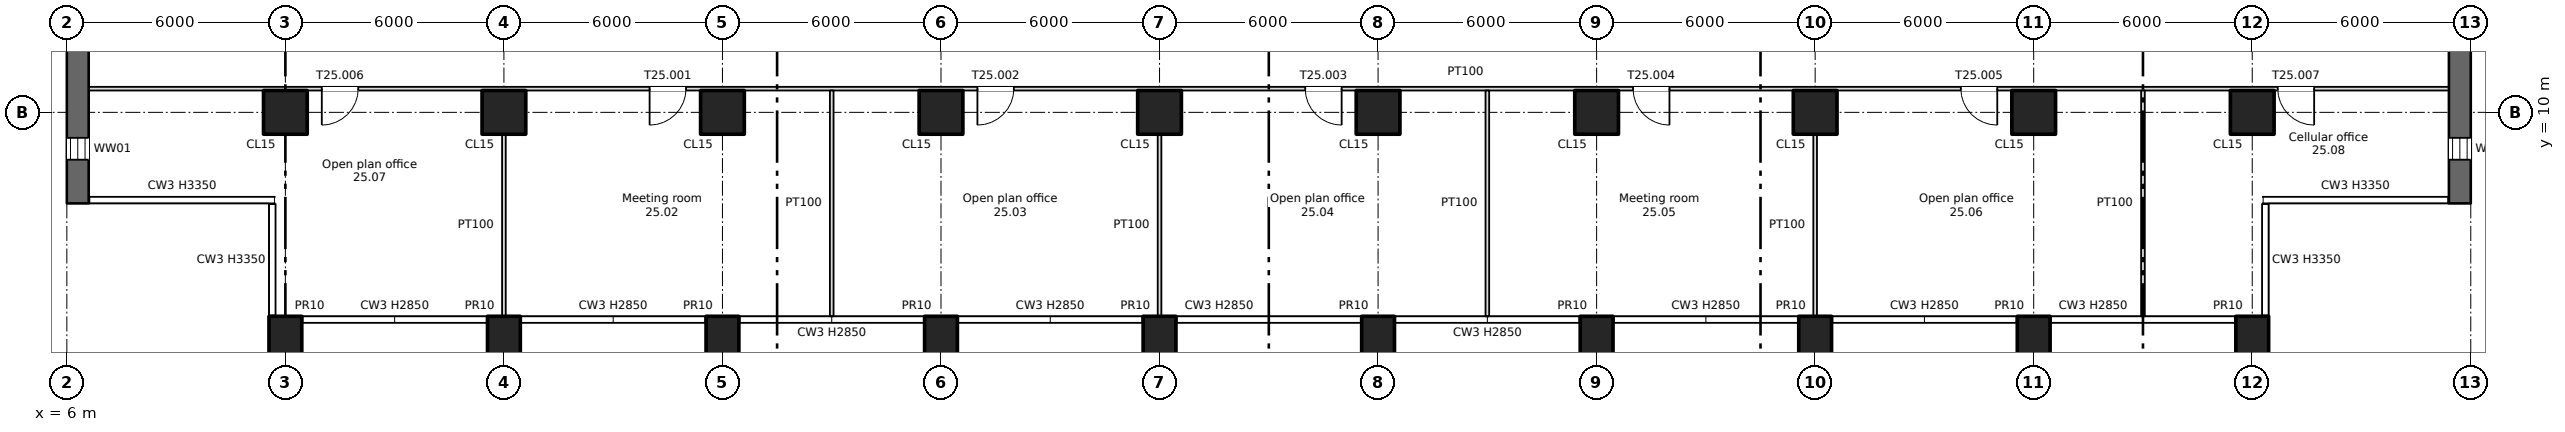
"""IFC4 building model, lengths in metres.
Left out: names, types, materials, properties, quantities, classifications, styles, units other than length and angle.
Written with IfcOpenShell. Run it as: python <this file> out.ifc"""

import sys

from ifc_helpers import new_model, si_unit, direction, frame, frame_2d, origin, origin_2d, place, context, subcontext, project, spatial, rectangle, extrude, element, fill, save


model = new_model("IFC4")
c1 = context("Model", 3, precision=1e-05, world=origin(), true_north=direction((0.0, 1.0)))
c2 = subcontext(c1, "Body", "Model", "MODEL_VIEW")
j1 = project(units=[si_unit("LENGTHUNIT", "METRE"), si_unit("PLANEANGLEUNIT", "RADIAN")], contexts=[c1])
p1 = place(None, origin())
s1 = spatial("IfcSite", under=j1, at=p1, CompositionType="ELEMENT")
p2 = place(p1, origin())
s2 = spatial("IfcBuilding", under=s1, at=p2, CompositionType="ELEMENT")
p3 = place(p2, frame((0.0, 0.0, 170.5)))
s3 = spatial("IfcBuildingStorey", under=s2, at=p3, CompositionType="ELEMENT", Elevation=170.5)
for number, where, z_axis, x_axis in (
    (1, (12.0, 3.7, -0.4), (0.0, 0.0, 1.0), (1.0, 0.0, 0.0)),
    (2, (18.0, 3.7, -0.4), (0.0, 0.0, 1.0), (1.0, 0.0, 0.0)),
    (3, (24.0, 3.7, -0.4), (0.0, 0.0, 1.0), (1.0, 0.0, 0.0)),
    (4, (30.0, 3.7, -0.4), (0.0, 0.0, 1.0), (1.0, 0.0, 0.0)),
    (5, (36.0, 3.7, -0.4), (0.0, 0.0, 1.0), (1.0, 0.0, 0.0)),
    (6, (42.0, 3.7, -0.4), (0.0, 0.0, 1.0), (1.0, 0.0, 0.0)),
    (7, (48.0, 3.7, -0.4), (0.0, 0.0, 1.0), (1.0, 0.0, 0.0)),
    (8, (54.0, 3.7, -0.4), (0.0, 0.0, 1.0), (1.0, 0.0, 0.0)),
    (9, (60.0, 3.7, -0.4), (0.0, 0.0, 1.0), (1.0, 0.0, 0.0)),
    (10, (66.0, 3.7, -0.4), (0.0, 0.0, 1.0), (1.0, 0.0, 0.0)),
):
    element("IfcColumn", number, at=place(p3, frame(where, z_axis=z_axis, x_axis=x_axis)), inside=s3, PredefinedType="COLUMN", context=c2, shape_type="SweptSolid", body=[
        extrude(rectangle(XDim=0.9, YDim=1.4, at=origin_2d()), origin(), (0.0, 0.0, 1.0), 3.75),
    ])
for number, where, z_axis, x_axis in (
    (11, (12.0, 10.0, 0.0), (0.0, 0.0, 1.0), (1.0, 0.0, 0.0)),
    (12, (18.0, 10.0, 0.0), (0.0, 0.0, 1.0), (1.0, 0.0, 0.0)),
    (13, (24.0, 10.0, 0.0), (0.0, 0.0, 1.0), (1.0, 0.0, 0.0)),
    (14, (30.0, 10.0, 0.0), (0.0, 0.0, 1.0), (1.0, 0.0, 0.0)),
    (15, (36.0, 10.0, 0.0), (0.0, 0.0, 1.0), (1.0, 0.0, 0.0)),
    (16, (42.0, 10.0, 0.0), (0.0, 0.0, 1.0), (1.0, 0.0, 0.0)),
    (17, (48.0, 10.0, 0.0), (0.0, 0.0, 1.0), (1.0, 0.0, 0.0)),
    (18, (54.0, 10.0, 0.0), (0.0, 0.0, 1.0), (1.0, 0.0, 0.0)),
    (19, (60.0, 10.0, 0.0), (0.0, 0.0, 1.0), (1.0, 0.0, 0.0)),
    (20, (66.0, 10.0, 0.0), (0.0, 0.0, 1.0), (1.0, 0.0, 0.0)),
):
    element("IfcColumn", number, at=place(p3, frame(where, z_axis=z_axis, x_axis=x_axis)), inside=s3, PredefinedType="COLUMN", context=c2, shape_type="SweptSolid", body=[
        extrude(rectangle(XDim=1.2, YDim=1.2, at=origin_2d()), origin(), (0.0, 0.0, 1.0), 3.35),
    ])
p4 = place(p3, frame((6.3, 7.5, 0.0), z_axis=(0.0, 0.0, 1.0), x_axis=(0.0, 1.0, 0.0)))
e21 = element("IfcWall", 21, at=p4, inside=s3, PredefinedType="SHEAR", context=c2, shape_type="SweptSolid", body=[
    extrude(rectangle(XDim=34.0, YDim=0.6, at=frame_2d((17.0, 0.0))), origin(), (0.0, 0.0, 1.0), 3.35),
])
p5 = place(p4, frame((1.2, 0.0, 0.6)))
e22 = element("IfcOpeningElement", 22, at=p5, cuts=e21, PredefinedType="OPENING", context=c2, shape_type="SweptSolid", body=[
    extrude(rectangle(XDim=0.6, YDim=2.4, at=frame_2d((0.3, 1.2))), frame((0.0, 0.31, 0.0), z_axis=(0.0, -1.0, 0.0), x_axis=(1.0, 0.0, 0.0)), (0.0, 0.0, 1.0), 0.62),
])
p6 = place(p4, frame((7.2, 0.0, 0.6)))
e23 = element("IfcOpeningElement", 23, at=p6, cuts=e21, PredefinedType="OPENING", context=c2, shape_type="SweptSolid", body=[
    extrude(rectangle(XDim=0.6, YDim=2.4, at=frame_2d((0.3, 1.2))), frame((0.0, 0.31, 0.0), z_axis=(0.0, -1.0, 0.0), x_axis=(1.0, 0.0, 0.0)), (0.0, 0.0, 1.0), 0.62),
])
p7 = place(p4, frame((19.2, 0.0, 0.6)))
e24 = element("IfcOpeningElement", 24, at=p7, cuts=e21, PredefinedType="OPENING", context=c2, shape_type="SweptSolid", body=[
    extrude(rectangle(XDim=0.6, YDim=2.4, at=frame_2d((0.3, 1.2))), frame((0.0, 0.31, 0.0), z_axis=(0.0, -1.0, 0.0), x_axis=(1.0, 0.0, 0.0)), (0.0, 0.0, 1.0), 0.62),
])
p8 = place(p3, frame((71.7, 7.5, 0.0), z_axis=(0.0, 0.0, 1.0), x_axis=(0.0, 1.0, 0.0)))
e25 = element("IfcWall", 25, at=p8, inside=s3, PredefinedType="SHEAR", context=c2, shape_type="SweptSolid", body=[
    extrude(rectangle(XDim=34.0, YDim=0.6, at=frame_2d((17.0, 0.0))), origin(), (0.0, 0.0, 1.0), 3.35),
])
p9 = place(p8, frame((1.2, 0.0, 0.6)))
e26 = element("IfcOpeningElement", 26, at=p9, cuts=e25, PredefinedType="OPENING", context=c2, shape_type="SweptSolid", body=[
    extrude(rectangle(XDim=0.6, YDim=2.4, at=frame_2d((0.3, 1.2))), frame((0.0, 0.31, 0.0), z_axis=(0.0, -1.0, 0.0), x_axis=(1.0, 0.0, 0.0)), (0.0, 0.0, 1.0), 0.62),
])
p10 = place(p8, frame((7.2, 0.0, 0.6)))
e27 = element("IfcOpeningElement", 27, at=p10, cuts=e25, PredefinedType="OPENING", context=c2, shape_type="SweptSolid", body=[
    extrude(rectangle(XDim=0.6, YDim=2.4, at=frame_2d((0.3, 1.2))), frame((0.0, 0.31, 0.0), z_axis=(0.0, -1.0, 0.0), x_axis=(1.0, 0.0, 0.0)), (0.0, 0.0, 1.0), 0.62),
])
p11 = place(p8, frame((13.2, 0.0, 0.6)))
e28 = element("IfcOpeningElement", 28, at=p11, cuts=e25, PredefinedType="OPENING", context=c2, shape_type="SweptSolid", body=[
    extrude(rectangle(XDim=0.6, YDim=2.4, at=frame_2d((0.3, 1.2))), frame((0.0, 0.31, 0.0), z_axis=(0.0, -1.0, 0.0), x_axis=(1.0, 0.0, 0.0)), (0.0, 0.0, 1.0), 0.62),
])
p12 = place(p8, frame((19.2, 0.0, 0.6)))
e29 = element("IfcOpeningElement", 29, at=p12, cuts=e25, PredefinedType="OPENING", context=c2, shape_type="SweptSolid", body=[
    extrude(rectangle(XDim=0.6, YDim=2.4, at=frame_2d((0.3, 1.2))), frame((0.0, 0.31, 0.0), z_axis=(0.0, -1.0, 0.0), x_axis=(1.0, 0.0, 0.0)), (0.0, 0.0, 1.0), 0.62),
])
p13 = place(p8, frame((25.2, 0.0, 0.6)))
e30 = element("IfcOpeningElement", 30, at=p13, cuts=e25, PredefinedType="OPENING", context=c2, shape_type="SweptSolid", body=[
    extrude(rectangle(XDim=0.6, YDim=2.4, at=frame_2d((0.3, 1.2))), frame((0.0, 0.31, 0.0), z_axis=(0.0, -1.0, 0.0), x_axis=(1.0, 0.0, 0.0)), (0.0, 0.0, 1.0), 0.62),
])
p14 = place(p8, frame((31.2, 0.0, 0.6)))
e31 = element("IfcOpeningElement", 31, at=p14, cuts=e25, PredefinedType="OPENING", context=c2, shape_type="SweptSolid", body=[
    extrude(rectangle(XDim=0.6, YDim=2.4, at=frame_2d((0.3, 1.2))), frame((0.0, 0.31, 0.0), z_axis=(0.0, -1.0, 0.0), x_axis=(1.0, 0.0, 0.0)), (0.0, 0.0, 1.0), 0.62),
])
p15 = place(p3, frame((6.6, 10.65, 0.0), z_axis=(0.0, 0.0, 1.0), x_axis=(1.0, 0.0, 0.0)))
e32 = element("IfcWall", 32, at=p15, inside=s3, PredefinedType="PARTITIONING", context=c2, shape_type="SweptSolid", body=[
    extrude(rectangle(XDim=64.8, YDim=0.1, at=frame_2d((32.4, 0.0))), origin(), (0.0, 0.0, 1.0), 3.35),
])
p16 = place(p15, frame((15.4, 0.0, 0.0)))
e33 = element("IfcOpeningElement", 33, at=p16, cuts=e32, PredefinedType="OPENING", context=c2, shape_type="SweptSolid", body=[
    extrude(rectangle(XDim=1.0, YDim=2.1, at=frame_2d((0.5, 1.05))), frame((0.0, 0.06, 0.0), z_axis=(0.0, -1.0, 0.0), x_axis=(1.0, 0.0, 0.0)), (0.0, 0.0, 1.0), 0.12),
])
p17 = place(p15, frame((24.4, 0.0, 0.0)))
e34 = element("IfcOpeningElement", 34, at=p17, cuts=e32, PredefinedType="OPENING", context=c2, shape_type="SweptSolid", body=[
    extrude(rectangle(XDim=1.0, YDim=2.1, at=frame_2d((0.5, 1.05))), frame((0.0, 0.06, 0.0), z_axis=(0.0, -1.0, 0.0), x_axis=(1.0, 0.0, 0.0)), (0.0, 0.0, 1.0), 0.12),
])
p18 = place(p15, frame((33.4, 0.0, 0.0)))
e35 = element("IfcOpeningElement", 35, at=p18, cuts=e32, PredefinedType="OPENING", context=c2, shape_type="SweptSolid", body=[
    extrude(rectangle(XDim=1.0, YDim=2.1, at=frame_2d((0.5, 1.05))), frame((0.0, 0.06, 0.0), z_axis=(0.0, -1.0, 0.0), x_axis=(1.0, 0.0, 0.0)), (0.0, 0.0, 1.0), 0.12),
])
p19 = place(p15, frame((42.4, 0.0, 0.0)))
e36 = element("IfcOpeningElement", 36, at=p19, cuts=e32, PredefinedType="OPENING", context=c2, shape_type="SweptSolid", body=[
    extrude(rectangle(XDim=1.0, YDim=2.1, at=frame_2d((0.5, 1.05))), frame((0.0, 0.06, 0.0), z_axis=(0.0, -1.0, 0.0), x_axis=(1.0, 0.0, 0.0)), (0.0, 0.0, 1.0), 0.12),
])
p20 = place(p15, frame((51.4, 0.0, 0.0)))
e37 = element("IfcOpeningElement", 37, at=p20, cuts=e32, PredefinedType="OPENING", context=c2, shape_type="SweptSolid", body=[
    extrude(rectangle(XDim=1.0, YDim=2.1, at=frame_2d((0.5, 1.05))), frame((0.0, 0.06, 0.0), z_axis=(0.0, -1.0, 0.0), x_axis=(1.0, 0.0, 0.0)), (0.0, 0.0, 1.0), 0.12),
])
p21 = place(p15, frame((6.4, 0.0, 0.0)))
e38 = element("IfcOpeningElement", 38, at=p21, cuts=e32, PredefinedType="OPENING", context=c2, shape_type="SweptSolid", body=[
    extrude(rectangle(XDim=1.0, YDim=2.1, at=frame_2d((0.5, 1.05))), frame((0.0, 0.06, 0.0), z_axis=(0.0, -1.0, 0.0), x_axis=(1.0, 0.0, 0.0)), (0.0, 0.0, 1.0), 0.12),
])
p22 = place(p15, frame((60.1, 0.0, 0.0)))
e39 = element("IfcOpeningElement", 39, at=p22, cuts=e32, PredefinedType="OPENING", context=c2, shape_type="SweptSolid", body=[
    extrude(rectangle(XDim=1.0, YDim=2.1, at=frame_2d((0.5, 1.05))), frame((0.0, 0.06, 0.0), z_axis=(0.0, -1.0, 0.0), x_axis=(1.0, 0.0, 0.0)), (0.0, 0.0, 1.0), 0.12),
])
p23 = place(p3, frame((18.0, 4.4, 0.0), z_axis=(0.0, 0.0, 1.0), x_axis=(0.0, 1.0, 0.0)))
e40 = element("IfcWall", 40, at=p23, inside=s3, PredefinedType="PARTITIONING", context=c2, shape_type="SweptSolid", body=[
    extrude(rectangle(XDim=5.0, YDim=0.1, at=frame_2d((2.5, 0.0))), origin(), (0.0, 0.0, 1.0), 3.35),
])
p24 = place(p3, frame((27.0, 4.4, 0.0), z_axis=(0.0, 0.0, 1.0), x_axis=(0.0, 1.0, 0.0)))
e41 = element("IfcWall", 41, at=p24, inside=s3, PredefinedType="PARTITIONING", context=c2, shape_type="SweptSolid", body=[
    extrude(rectangle(XDim=6.2, YDim=0.1, at=frame_2d((3.1, 0.0))), origin(), (0.0, 0.0, 1.0), 3.35),
])
p25 = place(p3, frame((36.0, 4.4, 0.0), z_axis=(0.0, 0.0, 1.0), x_axis=(0.0, 1.0, 0.0)))
e42 = element("IfcWall", 42, at=p25, inside=s3, PredefinedType="PARTITIONING", context=c2, shape_type="SweptSolid", body=[
    extrude(rectangle(XDim=5.0, YDim=0.1, at=frame_2d((2.5, 0.0))), origin(), (0.0, 0.0, 1.0), 3.35),
])
p26 = place(p3, frame((45.0, 4.4, 0.0), z_axis=(0.0, 0.0, 1.0), x_axis=(0.0, 1.0, 0.0)))
e43 = element("IfcWall", 43, at=p26, inside=s3, PredefinedType="PARTITIONING", context=c2, shape_type="SweptSolid", body=[
    extrude(rectangle(XDim=6.2, YDim=0.1, at=frame_2d((3.1, 0.0))), origin(), (0.0, 0.0, 1.0), 3.35),
])
p27 = place(p3, frame((54.0, 4.4, 0.0), z_axis=(0.0, 0.0, 1.0), x_axis=(0.0, 1.0, 0.0)))
e44 = element("IfcWall", 44, at=p27, inside=s3, PredefinedType="PARTITIONING", context=c2, shape_type="SweptSolid", body=[
    extrude(rectangle(XDim=5.0, YDim=0.1, at=frame_2d((2.5, 0.0))), origin(), (0.0, 0.0, 1.0), 3.35),
])
p28 = place(p3, frame((63.0, 4.4, 0.0), z_axis=(0.0, 0.0, 1.0), x_axis=(0.0, 1.0, 0.0)))
e45 = element("IfcWall", 45, at=p28, inside=s3, PredefinedType="PARTITIONING", context=c2, shape_type="SweptSolid", body=[
    extrude(rectangle(XDim=6.2, YDim=0.1, at=frame_2d((3.1, 0.0))), origin(), (0.0, 0.0, 1.0), 3.35),
])
p29 = place(p5, origin())
e46 = element("IfcWindow", 46, at=p29, inside=s3, PartitioningType="SINGLE_PANEL", PredefinedType="WINDOW", context=c2, shape_type="SweptSolid", body=[
    extrude(rectangle(XDim=0.6, YDim=2.4, at=frame_2d((0.3, 1.2))), frame((0.0, 0.03, 0.0), z_axis=(0.0, -1.0, 0.0), x_axis=(1.0, 0.0, 0.0)), (0.0, 0.0, 1.0), 0.06),
])
fill(e22, e46)
p30 = place(p9, origin())
e47 = element("IfcWindow", 47, at=p30, inside=s3, PartitioningType="SINGLE_PANEL", PredefinedType="WINDOW", context=c2, shape_type="SweptSolid", body=[
    extrude(rectangle(XDim=0.6, YDim=2.4, at=frame_2d((0.3, 1.2))), frame((0.0, 0.03, 0.0), z_axis=(0.0, -1.0, 0.0), x_axis=(1.0, 0.0, 0.0)), (0.0, 0.0, 1.0), 0.06),
])
fill(e26, e47)
p31 = place(p16, origin())
e48 = element("IfcDoor", 48, at=p31, inside=s3, OperationType="SINGLE_SWING_LEFT", PredefinedType="DOOR", context=c2, shape_type="SweptSolid", body=[
    extrude(rectangle(XDim=1.0, YDim=2.1, at=frame_2d((0.5, 1.05))), frame((0.0, 0.025, 0.0), z_axis=(0.0, -1.0, 0.0), x_axis=(1.0, 0.0, 0.0)), (0.0, 0.0, 1.0), 0.05),
])
fill(e33, e48)
p32 = place(p17, origin())
e49 = element("IfcDoor", 49, at=p32, inside=s3, OperationType="SINGLE_SWING_LEFT", PredefinedType="DOOR", context=c2, shape_type="SweptSolid", body=[
    extrude(rectangle(XDim=1.0, YDim=2.1, at=frame_2d((0.5, 1.05))), frame((0.0, 0.025, 0.0), z_axis=(0.0, -1.0, 0.0), x_axis=(1.0, 0.0, 0.0)), (0.0, 0.0, 1.0), 0.05),
])
fill(e34, e49)
p33 = place(p18, origin())
e50 = element("IfcDoor", 50, at=p33, inside=s3, OperationType="SINGLE_SWING_RIGHT", PredefinedType="DOOR", context=c2, shape_type="SweptSolid", body=[
    extrude(rectangle(XDim=1.0, YDim=2.1, at=frame_2d((0.5, 1.05))), frame((0.0, 0.025, 0.0), z_axis=(0.0, -1.0, 0.0), x_axis=(1.0, 0.0, 0.0)), (0.0, 0.0, 1.0), 0.05),
])
fill(e35, e50)
p34 = place(p19, origin())
e51 = element("IfcDoor", 51, at=p34, inside=s3, OperationType="SINGLE_SWING_RIGHT", PredefinedType="DOOR", context=c2, shape_type="SweptSolid", body=[
    extrude(rectangle(XDim=1.0, YDim=2.1, at=frame_2d((0.5, 1.05))), frame((0.0, 0.025, 0.0), z_axis=(0.0, -1.0, 0.0), x_axis=(1.0, 0.0, 0.0)), (0.0, 0.0, 1.0), 0.05),
])
fill(e36, e51)
p35 = place(p20, origin())
e52 = element("IfcDoor", 52, at=p35, inside=s3, OperationType="SINGLE_SWING_RIGHT", PredefinedType="DOOR", context=c2, shape_type="SweptSolid", body=[
    extrude(rectangle(XDim=1.0, YDim=2.1, at=frame_2d((0.5, 1.05))), frame((0.0, 0.025, 0.0), z_axis=(0.0, -1.0, 0.0), x_axis=(1.0, 0.0, 0.0)), (0.0, 0.0, 1.0), 0.05),
])
fill(e37, e52)
p36 = place(p21, origin())
e53 = element("IfcDoor", 53, at=p36, inside=s3, OperationType="SINGLE_SWING_LEFT", PredefinedType="DOOR", context=c2, shape_type="SweptSolid", body=[
    extrude(rectangle(XDim=1.0, YDim=2.1, at=frame_2d((0.5, 1.05))), frame((0.0, 0.025, 0.0), z_axis=(0.0, -1.0, 0.0), x_axis=(1.0, 0.0, 0.0)), (0.0, 0.0, 1.0), 0.05),
])
fill(e38, e53)
p37 = place(p22, origin())
e54 = element("IfcDoor", 54, at=p37, inside=s3, OperationType="SINGLE_SWING_RIGHT", PredefinedType="DOOR", context=c2, shape_type="SweptSolid", body=[
    extrude(rectangle(XDim=1.0, YDim=2.1, at=frame_2d((0.5, 1.05))), frame((0.0, 0.025, 0.0), z_axis=(0.0, -1.0, 0.0), x_axis=(1.0, 0.0, 0.0)), (0.0, 0.0, 1.0), 0.05),
])
fill(e39, e54)
save(model, sys.argv[1])
